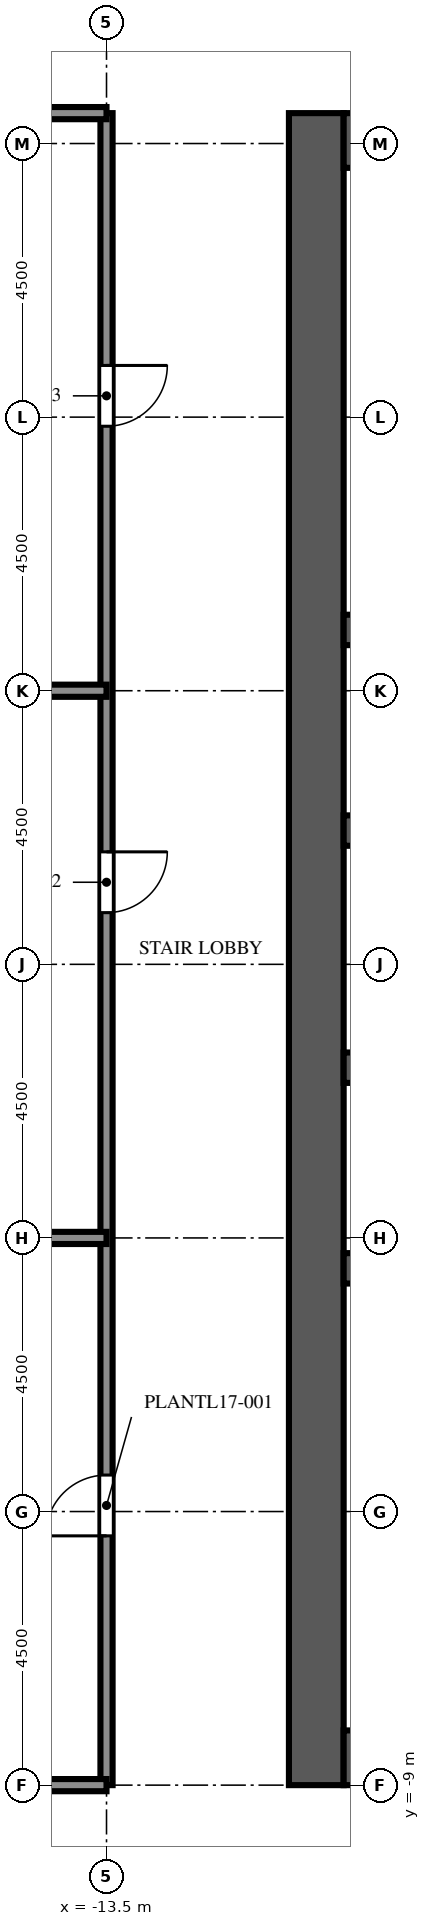
"""IFC4 building model, lengths in metres.
Left out: names, types, materials, properties, quantities, classifications, styles, units other than length and angle.
Written with IfcOpenShell. Run it as: python <this file> out.ifc"""

import sys

from ifc_helpers import new_model, si_unit, direction, frame, frame_2d, origin, place, context, subcontext, project, spatial, rectangle, extrude, element, fill, save


model = new_model("IFC4")
c1 = context("Model", 3, precision=1e-05, world=origin(), true_north=direction((0.0, 1.0)))
c2 = subcontext(c1, "Body", "Model", "MODEL_VIEW")
j1 = project(units=[si_unit("LENGTHUNIT", "METRE"), si_unit("PLANEANGLEUNIT", "RADIAN")], contexts=[c1])
p1 = place(None, origin())
s1 = spatial("IfcSite", under=j1, at=p1, CompositionType="ELEMENT")
p2 = place(p1, origin())
s2 = spatial("IfcBuilding", under=s1, at=p2, CompositionType="ELEMENT")
p3 = place(p2, frame((0.0, 0.0, 76.6)))
s3 = spatial("IfcBuildingStorey", under=s2, at=p3, CompositionType="ELEMENT", Elevation=76.6)
p4 = place(p3, frame((-10.05, -9.0, 0.0), z_axis=(0.0, 0.0, 1.0), x_axis=(0.0, 1.0, 0.0)))
e1 = element("IfcWall", 1, at=p4, inside=s3, PredefinedType="SHEAR", context=c2, shape_type="SweptSolid", body=[
    extrude(rectangle(XDim=27.5, YDim=0.9, at=frame_2d((13.75, 0.0))), origin(), (0.0, 0.0, 1.0), 5.4),
])
p5 = place(p4, frame((12.55, 0.0, 0.0)))
e2 = element("IfcOpeningElement", 2, at=p5, cuts=e1, PredefinedType="OPENING", context=c2, shape_type="SweptSolid", body=[
    extrude(rectangle(XDim=2.4, YDim=2.4, at=frame_2d((1.2, 1.2))), frame((0.0, 0.46, 0.0), z_axis=(0.0, -1.0, 0.0), x_axis=(1.0, 0.0, 0.0)), (0.0, 0.0, 1.0), 0.92),
])
p6 = place(p4, frame((6.825, 0.0, 0.0)))
e3 = element("IfcOpeningElement", 3, at=p6, cuts=e1, PredefinedType="OPENING", context=c2, shape_type="SweptSolid", body=[
    extrude(rectangle(XDim=1.2, YDim=2.1, at=frame_2d((0.6, 1.05))), frame((0.0, 0.46, 0.0), z_axis=(0.0, -1.0, 0.0), x_axis=(1.0, 0.0, 0.0)), (0.0, 0.0, 1.0), 0.92),
])
p7 = place(p4, frame((19.475, 0.0, 0.0)))
e4 = element("IfcOpeningElement", 4, at=p7, cuts=e1, PredefinedType="OPENING", context=c2, shape_type="SweptSolid", body=[
    extrude(rectangle(XDim=1.2, YDim=2.1, at=frame_2d((0.6, 1.05))), frame((0.0, 0.46, 0.0), z_axis=(0.0, -1.0, 0.0), x_axis=(1.0, 0.0, 0.0)), (0.0, 0.0, 1.0), 0.92),
])
for number, where, z_axis, x_axis in (
    (5, (-9.6, -8.55, 0.0), (0.0, 0.0, 1.0), (1.0, 0.0, 0.0)),
    (6, (-9.6, 18.05, 0.0), (0.0, 0.0, 1.0), (1.0, 0.0, 0.0)),
):
    element("IfcWall", number, at=place(p3, frame(where, z_axis=z_axis, x_axis=x_axis)), inside=s3, PredefinedType="SHEAR", context=c2, shape_type="SweptSolid", body=[
        extrude(rectangle(XDim=10.2, YDim=0.9, at=frame_2d((5.1, 0.0))), origin(), (0.0, 0.0, 1.0), 5.4),
    ])
p8 = place(p3, frame((-9.6, -0.5, 0.0), z_axis=(0.0, 0.0, 1.0), x_axis=(1.0, 0.0, 0.0)))
e7 = element("IfcWall", 7, at=p8, inside=s3, PredefinedType="SHEAR", context=c2, shape_type="SweptSolid", body=[
    extrude(rectangle(XDim=10.2, YDim=0.5, at=frame_2d((5.1, 0.0))), origin(), (0.0, 0.0, 1.0), 5.4),
])
p9 = place(p3, frame((-9.6, 2.8, 0.0), z_axis=(0.0, 0.0, 1.0), x_axis=(1.0, 0.0, 0.0)))
e8 = element("IfcWall", 8, at=p9, inside=s3, PredefinedType="SHEAR", context=c2, shape_type="SweptSolid", body=[
    extrude(rectangle(XDim=10.2, YDim=0.5, at=frame_2d((5.1, 0.0))), origin(), (0.0, 0.0, 1.0), 5.4),
])
p10 = place(p9, frame((0.562, 0.0, 0.0)))
e9 = element("IfcOpeningElement", 9, at=p10, cuts=e8, PredefinedType="OPENING", context=c2, shape_type="SweptSolid", body=[
    extrude(rectangle(XDim=1.1, YDim=2.1, at=frame_2d((0.55, 1.05))), frame((0.0, 0.26, 0.0), z_axis=(0.0, -1.0, 0.0), x_axis=(1.0, 0.0, 0.0)), (0.0, 0.0, 1.0), 0.52),
])
p11 = place(p9, frame((3.238, 0.0, 0.0)))
e10 = element("IfcOpeningElement", 10, at=p11, cuts=e8, PredefinedType="OPENING", context=c2, shape_type="SweptSolid", body=[
    extrude(rectangle(XDim=1.1, YDim=2.1, at=frame_2d((0.55, 1.05))), frame((0.0, 0.26, 0.0), z_axis=(0.0, -1.0, 0.0), x_axis=(1.0, 0.0, 0.0)), (0.0, 0.0, 1.0), 0.52),
])
p12 = place(p9, frame((8.538, 0.0, 0.0)))
e11 = element("IfcOpeningElement", 11, at=p12, cuts=e8, PredefinedType="OPENING", context=c2, shape_type="SweptSolid", body=[
    extrude(rectangle(XDim=1.1, YDim=2.1, at=frame_2d((0.55, 1.05))), frame((0.0, 0.26, 0.0), z_axis=(0.0, -1.0, 0.0), x_axis=(1.0, 0.0, 0.0)), (0.0, 0.0, 1.0), 0.52),
])
p13 = place(p3, frame((-9.6, 6.7, 0.0), z_axis=(0.0, 0.0, 1.0), x_axis=(1.0, 0.0, 0.0)))
e12 = element("IfcWall", 12, at=p13, inside=s3, PredefinedType="SHEAR", context=c2, shape_type="SweptSolid", body=[
    extrude(rectangle(XDim=10.2, YDim=0.5, at=frame_2d((5.1, 0.0))), origin(), (0.0, 0.0, 1.0), 5.4),
])
p14 = place(p13, frame((0.562, 0.0, 0.0)))
e13 = element("IfcOpeningElement", 13, at=p14, cuts=e12, PredefinedType="OPENING", context=c2, shape_type="SweptSolid", body=[
    extrude(rectangle(XDim=1.1, YDim=2.1, at=frame_2d((0.55, 1.05))), frame((0.0, 0.26, 0.0), z_axis=(0.0, -1.0, 0.0), x_axis=(1.0, 0.0, 0.0)), (0.0, 0.0, 1.0), 0.52),
])
p15 = place(p13, frame((3.288, 0.0, 0.0)))
e14 = element("IfcOpeningElement", 14, at=p15, cuts=e12, PredefinedType="OPENING", context=c2, shape_type="SweptSolid", body=[
    extrude(rectangle(XDim=1.0, YDim=2.1, at=frame_2d((0.5, 1.05))), frame((0.0, 0.26, 0.0), z_axis=(0.0, -1.0, 0.0), x_axis=(1.0, 0.0, 0.0)), (0.0, 0.0, 1.0), 0.52),
])
p16 = place(p13, frame((5.913, 0.0, 0.0)))
e15 = element("IfcOpeningElement", 15, at=p16, cuts=e12, PredefinedType="OPENING", context=c2, shape_type="SweptSolid", body=[
    extrude(rectangle(XDim=1.0, YDim=2.1, at=frame_2d((0.5, 1.05))), frame((0.0, 0.26, 0.0), z_axis=(0.0, -1.0, 0.0), x_axis=(1.0, 0.0, 0.0)), (0.0, 0.0, 1.0), 0.52),
])
p17 = place(p13, frame((8.587, 0.0, 0.0)))
e16 = element("IfcOpeningElement", 16, at=p17, cuts=e12, PredefinedType="OPENING", context=c2, shape_type="SweptSolid", body=[
    extrude(rectangle(XDim=1.0, YDim=2.1, at=frame_2d((0.5, 1.05))), frame((0.0, 0.26, 0.0), z_axis=(0.0, -1.0, 0.0), x_axis=(1.0, 0.0, 0.0)), (0.0, 0.0, 1.0), 0.52),
])
p18 = place(p3, frame((-9.6, 10.0, 0.0), z_axis=(0.0, 0.0, 1.0), x_axis=(1.0, 0.0, 0.0)))
e17 = element("IfcWall", 17, at=p18, inside=s3, PredefinedType="SHEAR", context=c2, shape_type="SweptSolid", body=[
    extrude(rectangle(XDim=10.2, YDim=0.5, at=frame_2d((5.1, 0.0))), origin(), (0.0, 0.0, 1.0), 5.4),
])
p19 = place(p3, frame((-13.5, -9.0, 0.0), z_axis=(0.0, 0.0, 1.0), x_axis=(0.0, 1.0, 0.0)))
e18 = element("IfcWall", 18, at=p19, inside=s3, PredefinedType="PARTITIONING", context=c2, shape_type="SweptSolid", body=[
    extrude(rectangle(XDim=27.5, YDim=0.2, at=frame_2d((13.75, 0.0))), origin(), (0.0, 0.0, 1.0), 4.95),
])
p20 = place(p19, frame((4.1, 0.0, 0.0)))
e19 = element("IfcOpeningElement", 19, at=p20, cuts=e18, PredefinedType="OPENING", context=c2, shape_type="SweptSolid", body=[
    extrude(rectangle(XDim=1.0, YDim=2.1, at=frame_2d((0.5, 1.05))), frame((0.0, 0.11, 0.0), z_axis=(0.0, -1.0, 0.0), x_axis=(1.0, 0.0, 0.0)), (0.0, 0.0, 1.0), 0.22),
])
p21 = place(p19, frame((14.35, 0.0, 0.0)))
e20 = element("IfcOpeningElement", 20, at=p21, cuts=e18, PredefinedType="OPENING", context=c2, shape_type="SweptSolid", body=[
    extrude(rectangle(XDim=1.0, YDim=2.1, at=frame_2d((0.5, 1.05))), frame((0.0, 0.11, 0.0), z_axis=(0.0, -1.0, 0.0), x_axis=(1.0, 0.0, 0.0)), (0.0, 0.0, 1.0), 0.22),
])
p22 = place(p19, frame((22.35, 0.0, 0.0)))
e21 = element("IfcOpeningElement", 21, at=p22, cuts=e18, PredefinedType="OPENING", context=c2, shape_type="SweptSolid", body=[
    extrude(rectangle(XDim=1.0, YDim=2.1, at=frame_2d((0.5, 1.05))), frame((0.0, 0.11, 0.0), z_axis=(0.0, -1.0, 0.0), x_axis=(1.0, 0.0, 0.0)), (0.0, 0.0, 1.0), 0.22),
])
for number, where, z_axis, x_axis in (
    (22, (-17.3, -9.0, 0.0), (0.0, 0.0, 1.0), (1.0, 0.0, 0.0)),
    (23, (-17.3, 0.0, 0.0), (0.0, 0.0, 1.0), (1.0, 0.0, 0.0)),
    (24, (-17.3, 9.0, 0.0), (0.0, 0.0, 1.0), (1.0, 0.0, 0.0)),
    (25, (-17.3, 18.5, 0.0), (0.0, 0.0, 1.0), (1.0, 0.0, 0.0)),
):
    element("IfcWall", number, at=place(p3, frame(where, z_axis=z_axis, x_axis=x_axis)), inside=s3, PredefinedType="PARTITIONING", context=c2, shape_type="SweptSolid", body=[
        extrude(rectangle(XDim=3.8, YDim=0.2, at=frame_2d((1.9, 0.0))), origin(), (0.0, 0.0, 1.0), 4.95),
    ])
p23 = place(p5, origin())
e26 = element("IfcDoor", 26, at=p23, inside=s3, OperationType="DOUBLE_DOOR_DOUBLE_SWING", PredefinedType="DOOR", context=c2, shape_type="SweptSolid", body=[
    extrude(rectangle(XDim=2.4, YDim=2.4, at=frame_2d((1.2, 1.2))), frame((0.0, 0.025, 0.0), z_axis=(0.0, -1.0, 0.0), x_axis=(1.0, 0.0, 0.0)), (0.0, 0.0, 1.0), 0.05),
])
fill(e2, e26)
p24 = place(p6, origin())
e27 = element("IfcDoor", 27, at=p24, inside=s3, OperationType="SINGLE_SWING_LEFT", PredefinedType="DOOR", context=c2, shape_type="SweptSolid", body=[
    extrude(rectangle(XDim=1.2, YDim=2.1, at=frame_2d((0.6, 1.05))), frame((0.0, 0.025, 0.0), z_axis=(0.0, -1.0, 0.0), x_axis=(1.0, 0.0, 0.0)), (0.0, 0.0, 1.0), 0.05),
])
fill(e3, e27)
p25 = place(p7, origin())
e28 = element("IfcDoor", 28, at=p25, inside=s3, OperationType="SINGLE_SWING_LEFT", PredefinedType="DOOR", context=c2, shape_type="SweptSolid", body=[
    extrude(rectangle(XDim=1.2, YDim=2.1, at=frame_2d((0.6, 1.05))), frame((0.0, 0.025, 0.0), z_axis=(0.0, -1.0, 0.0), x_axis=(1.0, 0.0, 0.0)), (0.0, 0.0, 1.0), 0.05),
])
fill(e4, e28)
p26 = place(p20, origin())
e29 = element("IfcDoor", 29, at=p26, inside=s3, OperationType="SINGLE_SWING_LEFT", PredefinedType="DOOR", context=c2, shape_type="SweptSolid", body=[
    extrude(rectangle(XDim=1.0, YDim=2.1, at=frame_2d((0.5, 1.05))), frame((0.0, 0.025, 0.0), z_axis=(0.0, -1.0, 0.0), x_axis=(1.0, 0.0, 0.0)), (0.0, 0.0, 1.0), 0.05),
])
fill(e19, e29)
p27 = place(p21, origin())
e30 = element("IfcDoor", 30, at=p27, inside=s3, OperationType="SINGLE_SWING_RIGHT", PredefinedType="DOOR", context=c2, shape_type="SweptSolid", body=[
    extrude(rectangle(XDim=1.0, YDim=2.1, at=frame_2d((0.5, 1.05))), frame((0.0, 0.025, 0.0), z_axis=(0.0, -1.0, 0.0), x_axis=(1.0, 0.0, 0.0)), (0.0, 0.0, 1.0), 0.05),
])
fill(e20, e30)
p28 = place(p22, origin())
e31 = element("IfcDoor", 31, at=p28, inside=s3, OperationType="SINGLE_SWING_RIGHT", PredefinedType="DOOR", context=c2, shape_type="SweptSolid", body=[
    extrude(rectangle(XDim=1.0, YDim=2.1, at=frame_2d((0.5, 1.05))), frame((0.0, 0.025, 0.0), z_axis=(0.0, -1.0, 0.0), x_axis=(1.0, 0.0, 0.0)), (0.0, 0.0, 1.0), 0.05),
])
fill(e21, e31)
save(model, sys.argv[1])
